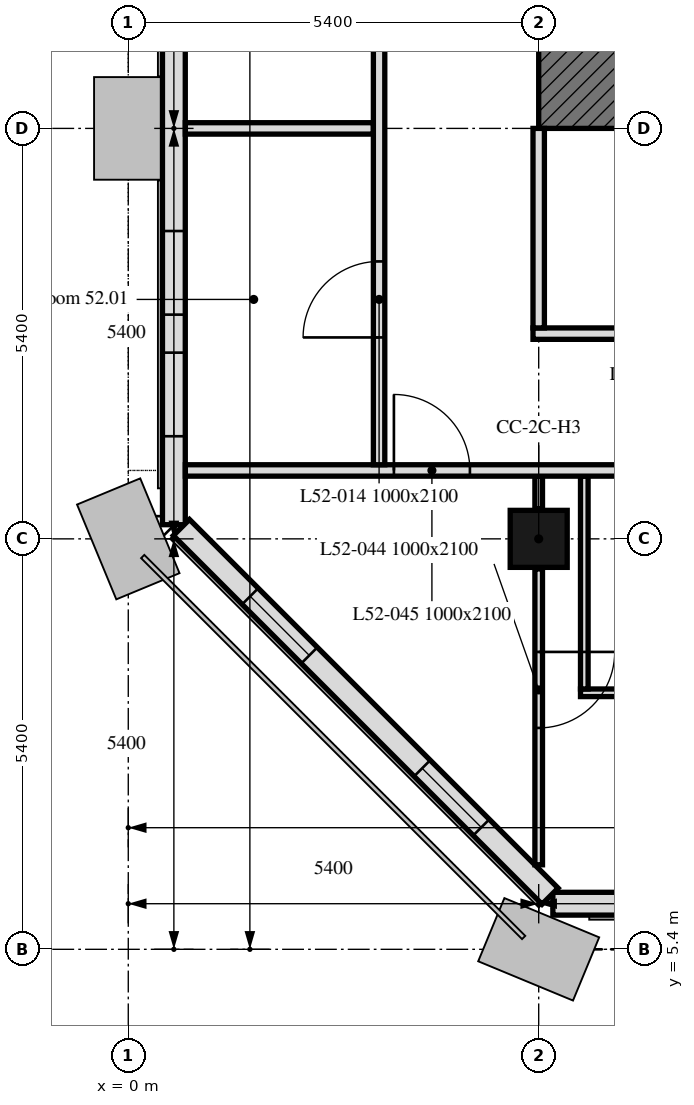
"""IFC4 building model, lengths in metres.
Left out: names, types, materials, properties, quantities, classifications, styles, units other than length and angle.
Written with IfcOpenShell. Run it as: python <this file> out.ifc"""

import sys

from ifc_helpers import new_model, si_unit, direction, frame, frame_2d, origin, origin_2d, place, context, subcontext, project, spatial, rectangle, extrude, element, fill, save


model = new_model("IFC4")
c1 = context("Model", 3, precision=1e-05, world=origin(), true_north=direction((0.0, 1.0)))
c2 = subcontext(c1, "Body", "Model", "MODEL_VIEW")
j1 = project(units=[si_unit("LENGTHUNIT", "METRE"), si_unit("PLANEANGLEUNIT", "RADIAN")], contexts=[c1])
p1 = place(None, origin())
s1 = spatial("IfcSite", under=j1, at=p1, CompositionType="ELEMENT")
p2 = place(p1, origin())
s2 = spatial("IfcBuilding", under=s1, at=p2, CompositionType="ELEMENT")
p3 = place(p2, frame((0.0, 0.0, 210.4)))
s3 = spatial("IfcBuildingStorey", under=s2, at=p3, CompositionType="ELEMENT", Elevation=210.4)
p4 = place(p3, frame((5.4, 10.8, 0.0), z_axis=(0.0, 0.0, 1.0), x_axis=(1.0, 0.0, 0.0)))
e1 = element("IfcColumn", 1, at=p4, inside=s3, PredefinedType="COLUMN", context=c2, shape_type="SweptSolid", body=[
    extrude(rectangle(XDim=0.75, YDim=0.75, at=origin_2d()), origin(), (0.0, 0.0, 1.0), 3.0),
])
p5 = place(p3, frame((5.586, 6.0, 0.0), z_axis=(0.0, 0.0, 1.0), x_axis=(1.0, 0.0, 0.0)))
e2 = element("IfcWall", 2, at=p5, inside=s3, PredefinedType="SOLIDWALL", context=c2, shape_type="SweptSolid", body=[
    extrude(rectangle(XDim=32.027, YDim=0.3, at=frame_2d((16.014, 0.0))), origin(), (0.0, 0.0, 1.0), 3.0),
])
p6 = place(p5, frame((2.764, 0.0, 0.9)))
e3 = element("IfcOpeningElement", 3, at=p6, cuts=e2, PredefinedType="OPENING", context=c2, shape_type="SweptSolid", body=[
    extrude(rectangle(XDim=1.1, YDim=1.7, at=frame_2d((0.55, 0.85))), frame((0.0, 0.16, 0.0), z_axis=(0.0, -1.0, 0.0), x_axis=(1.0, 0.0, 0.0)), (0.0, 0.0, 1.0), 0.32),
])
p7 = place(p5, frame((6.214, 0.0, 0.9)))
e4 = element("IfcOpeningElement", 4, at=p7, cuts=e2, PredefinedType="OPENING", context=c2, shape_type="SweptSolid", body=[
    extrude(rectangle(XDim=3.4, YDim=1.7, at=frame_2d((1.7, 0.85))), frame((0.0, 0.16, 0.0), z_axis=(0.0, -1.0, 0.0), x_axis=(1.0, 0.0, 0.0)), (0.0, 0.0, 1.0), 0.32),
])
p8 = place(p5, frame((13.564, 0.0, 0.9)))
e5 = element("IfcOpeningElement", 5, at=p8, cuts=e2, PredefinedType="OPENING", context=c2, shape_type="SweptSolid", body=[
    extrude(rectangle(XDim=1.1, YDim=1.7, at=frame_2d((0.55, 0.85))), frame((0.0, 0.16, 0.0), z_axis=(0.0, -1.0, 0.0), x_axis=(1.0, 0.0, 0.0)), (0.0, 0.0, 1.0), 0.32),
])
p9 = place(p5, frame((17.014, 0.0, 0.9)))
e6 = element("IfcOpeningElement", 6, at=p9, cuts=e2, PredefinedType="OPENING", context=c2, shape_type="SweptSolid", body=[
    extrude(rectangle(XDim=3.4, YDim=1.7, at=frame_2d((1.7, 0.85))), frame((0.0, 0.16, 0.0), z_axis=(0.0, -1.0, 0.0), x_axis=(1.0, 0.0, 0.0)), (0.0, 0.0, 1.0), 0.32),
])
p10 = place(p5, frame((24.364, 0.0, 0.9)))
e7 = element("IfcOpeningElement", 7, at=p10, cuts=e2, PredefinedType="OPENING", context=c2, shape_type="SweptSolid", body=[
    extrude(rectangle(XDim=1.1, YDim=1.7, at=frame_2d((0.55, 0.85))), frame((0.0, 0.16, 0.0), z_axis=(0.0, -1.0, 0.0), x_axis=(1.0, 0.0, 0.0)), (0.0, 0.0, 1.0), 0.32),
])
p11 = place(p5, frame((27.814, 0.0, 0.9)))
e8 = element("IfcOpeningElement", 8, at=p11, cuts=e2, PredefinedType="OPENING", context=c2, shape_type="SweptSolid", body=[
    extrude(rectangle(XDim=3.4, YDim=1.7, at=frame_2d((1.7, 0.85))), frame((0.0, 0.16, 0.0), z_axis=(0.0, -1.0, 0.0), x_axis=(1.0, 0.0, 0.0)), (0.0, 0.0, 1.0), 0.32),
])
p12 = place(p3, frame((0.6, 43.014, 0.0), z_axis=(0.0, 0.0, 1.0), x_axis=(0.0, -1.0, 0.0)))
e9 = element("IfcWall", 9, at=p12, inside=s3, PredefinedType="SOLIDWALL", context=c2, shape_type="SweptSolid", body=[
    extrude(rectangle(XDim=32.027, YDim=0.3, at=frame_2d((16.014, 0.0))), origin(), (0.0, 0.0, 1.0), 3.0),
])
p13 = place(p12, frame((1.164, 0.0, 0.9)))
e10 = element("IfcOpeningElement", 10, at=p13, cuts=e9, PredefinedType="OPENING", context=c2, shape_type="SweptSolid", body=[
    extrude(rectangle(XDim=1.1, YDim=1.7, at=frame_2d((0.55, 0.85))), frame((0.0, 0.16, 0.0), z_axis=(0.0, -1.0, 0.0), x_axis=(1.0, 0.0, 0.0)), (0.0, 0.0, 1.0), 0.32),
])
p14 = place(p12, frame((3.139, 0.0, 0.9)))
e11 = element("IfcOpeningElement", 11, at=p14, cuts=e9, PredefinedType="OPENING", context=c2, shape_type="SweptSolid", body=[
    extrude(rectangle(XDim=0.65, YDim=1.7, at=frame_2d((0.325, 0.85))), frame((0.0, 0.16, 0.0), z_axis=(0.0, -1.0, 0.0), x_axis=(1.0, 0.0, 0.0)), (0.0, 0.0, 1.0), 0.32),
])
p15 = place(p12, frame((6.214, 0.0, 0.9)))
e12 = element("IfcOpeningElement", 12, at=p15, cuts=e9, PredefinedType="OPENING", context=c2, shape_type="SweptSolid", body=[
    extrude(rectangle(XDim=3.4, YDim=1.7, at=frame_2d((1.7, 0.85))), frame((0.0, 0.16, 0.0), z_axis=(0.0, -1.0, 0.0), x_axis=(1.0, 0.0, 0.0)), (0.0, 0.0, 1.0), 0.32),
])
p16 = place(p12, frame((11.964, 0.0, 0.9)))
e13 = element("IfcOpeningElement", 13, at=p16, cuts=e9, PredefinedType="OPENING", context=c2, shape_type="SweptSolid", body=[
    extrude(rectangle(XDim=1.1, YDim=1.7, at=frame_2d((0.55, 0.85))), frame((0.0, 0.16, 0.0), z_axis=(0.0, -1.0, 0.0), x_axis=(1.0, 0.0, 0.0)), (0.0, 0.0, 1.0), 0.32),
])
p17 = place(p12, frame((13.564, 0.0, 0.9)))
e14 = element("IfcOpeningElement", 14, at=p17, cuts=e9, PredefinedType="OPENING", context=c2, shape_type="SweptSolid", body=[
    extrude(rectangle(XDim=1.1, YDim=1.7, at=frame_2d((0.55, 0.85))), frame((0.0, 0.16, 0.0), z_axis=(0.0, -1.0, 0.0), x_axis=(1.0, 0.0, 0.0)), (0.0, 0.0, 1.0), 0.32),
])
p18 = place(p12, frame((17.364, 0.0, 0.9)))
e15 = element("IfcOpeningElement", 15, at=p18, cuts=e9, PredefinedType="OPENING", context=c2, shape_type="SweptSolid", body=[
    extrude(rectangle(XDim=1.1, YDim=1.7, at=frame_2d((0.55, 0.85))), frame((0.0, 0.16, 0.0), z_axis=(0.0, -1.0, 0.0), x_axis=(1.0, 0.0, 0.0)), (0.0, 0.0, 1.0), 0.32),
])
p19 = place(p12, frame((18.964, 0.0, 0.9)))
e16 = element("IfcOpeningElement", 16, at=p19, cuts=e9, PredefinedType="OPENING", context=c2, shape_type="SweptSolid", body=[
    extrude(rectangle(XDim=1.1, YDim=1.7, at=frame_2d((0.55, 0.85))), frame((0.0, 0.16, 0.0), z_axis=(0.0, -1.0, 0.0), x_axis=(1.0, 0.0, 0.0)), (0.0, 0.0, 1.0), 0.32),
])
p20 = place(p12, frame((22.764, 0.0, 0.9)))
e17 = element("IfcOpeningElement", 17, at=p20, cuts=e9, PredefinedType="OPENING", context=c2, shape_type="SweptSolid", body=[
    extrude(rectangle(XDim=1.1, YDim=1.7, at=frame_2d((0.55, 0.85))), frame((0.0, 0.16, 0.0), z_axis=(0.0, -1.0, 0.0), x_axis=(1.0, 0.0, 0.0)), (0.0, 0.0, 1.0), 0.32),
])
p21 = place(p12, frame((24.364, 0.0, 0.9)))
e18 = element("IfcOpeningElement", 18, at=p21, cuts=e9, PredefinedType="OPENING", context=c2, shape_type="SweptSolid", body=[
    extrude(rectangle(XDim=1.1, YDim=1.7, at=frame_2d((0.55, 0.85))), frame((0.0, 0.16, 0.0), z_axis=(0.0, -1.0, 0.0), x_axis=(1.0, 0.0, 0.0)), (0.0, 0.0, 1.0), 0.32),
])
p22 = place(p12, frame((28.164, 0.0, 0.9)))
e19 = element("IfcOpeningElement", 19, at=p22, cuts=e9, PredefinedType="OPENING", context=c2, shape_type="SweptSolid", body=[
    extrude(rectangle(XDim=1.1, YDim=1.7, at=frame_2d((0.55, 0.85))), frame((0.0, 0.16, 0.0), z_axis=(0.0, -1.0, 0.0), x_axis=(1.0, 0.0, 0.0)), (0.0, 0.0, 1.0), 0.32),
])
p23 = place(p12, frame((29.764, 0.0, 0.9)))
e20 = element("IfcOpeningElement", 20, at=p23, cuts=e9, PredefinedType="OPENING", context=c2, shape_type="SweptSolid", body=[
    extrude(rectangle(XDim=1.1, YDim=1.7, at=frame_2d((0.55, 0.85))), frame((0.0, 0.16, 0.0), z_axis=(0.0, -1.0, 0.0), x_axis=(1.0, 0.0, 0.0)), (0.0, 0.0, 1.0), 0.32),
])
p24 = place(p3, frame((0.699, 10.949, 0.0), z_axis=(0.0, 0.0, 1.0), x_axis=(0.707106781187, -0.707106781187, 0.0)))
e21 = element("IfcWall", 21, at=p24, inside=s3, PredefinedType="SOLIDWALL", context=c2, shape_type="SweptSolid", body=[
    extrude(rectangle(XDim=6.86, YDim=0.3, at=frame_2d((3.43, 0.0))), origin(), (0.0, 0.0, 1.0), 3.0),
])
p25 = place(p24, frame((1.28, 0.0, 0.9)))
e22 = element("IfcOpeningElement", 22, at=p25, cuts=e21, PredefinedType="OPENING", context=c2, shape_type="SweptSolid", body=[
    extrude(rectangle(XDim=1.1, YDim=1.7, at=frame_2d((0.55, 0.85))), frame((0.0, 0.16, 0.0), z_axis=(0.0, -1.0, 0.0), x_axis=(1.0, 0.0, 0.0)), (0.0, 0.0, 1.0), 0.32),
])
p26 = place(p24, frame((4.48, 0.0, 0.9)))
e23 = element("IfcOpeningElement", 23, at=p26, cuts=e21, PredefinedType="OPENING", context=c2, shape_type="SweptSolid", body=[
    extrude(rectangle(XDim=1.1, YDim=1.7, at=frame_2d((0.55, 0.85))), frame((0.0, 0.16, 0.0), z_axis=(0.0, -1.0, 0.0), x_axis=(1.0, 0.0, 0.0)), (0.0, 0.0, 1.0), 0.32),
])
p27 = place(p3, frame((6.0, 16.2, 0.0), z_axis=(0.0, 0.0, 1.0), x_axis=(0.0, 1.0, 0.0)))
e24 = element("IfcWall", 24, at=p27, inside=s3, PredefinedType="SOLIDWALL", context=c2, shape_type="SweptSolid", body=[
    extrude(rectangle(XDim=16.2, YDim=1.2, at=frame_2d((8.1, 0.0))), origin(), (0.0, 0.0, 1.0), 3.0),
])
p28 = place(p3, frame((3.225, 16.2, 0.0), z_axis=(0.0, 0.0, 1.0), x_axis=(-1.0, 0.0, 0.0)))
e25 = element("IfcWall", 25, at=p28, inside=s3, PredefinedType="PARTITIONING", context=c2, shape_type="SweptSolid", body=[
    extrude(rectangle(XDim=2.474, YDim=0.15, at=frame_2d((1.237, 0.0))), origin(), (0.0, 0.0, 1.0), 2.4),
])
p29 = place(p3, frame((8.35, 8.775, 0.0), z_axis=(0.0, 0.0, 1.0), x_axis=(-1.0, 0.0, 0.0)))
e26 = element("IfcWall", 26, at=p29, inside=s3, PredefinedType="PARTITIONING", context=c2, shape_type="SweptSolid", body=[
    extrude(rectangle(XDim=2.4, YDim=0.1, at=frame_2d((1.2, 0.0))), origin(), (0.0, 0.0, 1.0), 3.0),
])
p30 = place(p3, frame((6.0, 8.825, 0.0), z_axis=(0.0, 0.0, 1.0), x_axis=(0.0, 1.0, 0.0)))
e27 = element("IfcWall", 27, at=p30, inside=s3, PredefinedType="PARTITIONING", context=c2, shape_type="SweptSolid", body=[
    extrude(rectangle(XDim=2.8, YDim=0.1, at=frame_2d((1.4, 0.0))), origin(), (0.0, 0.0, 1.0), 3.0),
])
p31 = place(p3, frame((5.4, 11.625, 0.0), z_axis=(0.0, 0.0, 1.0), x_axis=(0.0, -1.0, 0.0)))
e28 = element("IfcWall", 28, at=p31, inside=s3, PredefinedType="PARTITIONING", context=c2, shape_type="SweptSolid", body=[
    extrude(rectangle(XDim=0.43, YDim=0.1, at=frame_2d((0.215, 0.0))), origin(), (0.0, 0.0, 1.0), 3.0),
])
p32 = place(p3, frame((5.4, 10.405, 0.0), z_axis=(0.0, 0.0, 1.0), x_axis=(0.0, -1.0, 0.0)))
e29 = element("IfcWall", 29, at=p32, inside=s3, PredefinedType="PARTITIONING", context=c2, shape_type="SweptSolid", body=[
    extrude(rectangle(XDim=3.893, YDim=0.1, at=frame_2d((1.946, 0.0))), origin(), (0.0, 0.0, 1.0), 3.0),
])
p33 = place(p32, frame((1.093, 0.0, 0.0)))
e30 = element("IfcOpeningElement", 30, at=p33, cuts=e29, PredefinedType="OPENING", context=c2, shape_type="SweptSolid", body=[
    extrude(rectangle(XDim=1.0, YDim=2.1, at=frame_2d((0.5, 1.05))), frame((0.0, 0.05, 0.0), z_axis=(0.0, -1.0, 0.0), x_axis=(1.0, 0.0, 0.0)), (0.0, 0.0, 1.0), 0.1),
])
p34 = place(p3, frame((0.751, 11.7, 0.0), z_axis=(0.0, 0.0, 1.0), x_axis=(1.0, 0.0, 0.0)))
e31 = element("IfcWall", 31, at=p34, inside=s3, PredefinedType="PARTITIONING", context=c2, shape_type="SweptSolid", body=[
    extrude(rectangle(XDim=41.698, YDim=0.15, at=frame_2d((20.849, 0.0))), origin(), (0.0, 0.0, 1.0), 3.0),
])
p35 = place(p34, frame((39.249, 0.0, 0.0)))
e32 = element("IfcOpeningElement", 32, at=p35, cuts=e31, PredefinedType="OPENING", context=c2, shape_type="SweptSolid", body=[
    extrude(rectangle(XDim=1.0, YDim=2.1, at=frame_2d((0.5, 1.05))), frame((0.0, 0.075, 0.0), z_axis=(0.0, -1.0, 0.0), x_axis=(1.0, 0.0, 0.0)), (0.0, 0.0, 1.0), 0.15),
])
p36 = place(p34, frame((27.649, 0.0, 0.0)))
e33 = element("IfcOpeningElement", 33, at=p36, cuts=e31, PredefinedType="OPENING", context=c2, shape_type="SweptSolid", body=[
    extrude(rectangle(XDim=1.0, YDim=2.1, at=frame_2d((0.5, 1.05))), frame((0.0, 0.075, 0.0), z_axis=(0.0, -1.0, 0.0), x_axis=(1.0, 0.0, 0.0)), (0.0, 0.0, 1.0), 0.15),
])
p37 = place(p34, frame((22.249, 0.0, 0.0)))
e34 = element("IfcOpeningElement", 34, at=p37, cuts=e31, PredefinedType="OPENING", context=c2, shape_type="SweptSolid", body=[
    extrude(rectangle(XDim=1.0, YDim=2.1, at=frame_2d((0.5, 1.05))), frame((0.0, 0.075, 0.0), z_axis=(0.0, -1.0, 0.0), x_axis=(1.0, 0.0, 0.0)), (0.0, 0.0, 1.0), 0.15),
])
p38 = place(p34, frame((16.849, 0.0, 0.0)))
e35 = element("IfcOpeningElement", 35, at=p38, cuts=e31, PredefinedType="OPENING", context=c2, shape_type="SweptSolid", body=[
    extrude(rectangle(XDim=1.0, YDim=2.1, at=frame_2d((0.5, 1.05))), frame((0.0, 0.075, 0.0), z_axis=(0.0, -1.0, 0.0), x_axis=(1.0, 0.0, 0.0)), (0.0, 0.0, 1.0), 0.15),
])
p39 = place(p34, frame((11.449, 0.0, 0.0)))
e36 = element("IfcOpeningElement", 36, at=p39, cuts=e31, PredefinedType="OPENING", context=c2, shape_type="SweptSolid", body=[
    extrude(rectangle(XDim=1.0, YDim=2.1, at=frame_2d((0.5, 1.05))), frame((0.0, 0.075, 0.0), z_axis=(0.0, -1.0, 0.0), x_axis=(1.0, 0.0, 0.0)), (0.0, 0.0, 1.0), 0.15),
])
p40 = place(p34, frame((2.744, 0.0, 0.0)))
e37 = element("IfcOpeningElement", 37, at=p40, cuts=e31, PredefinedType="OPENING", context=c2, shape_type="SweptSolid", body=[
    extrude(rectangle(XDim=1.0, YDim=2.1, at=frame_2d((0.5, 1.05))), frame((0.0, 0.075, 0.0), z_axis=(0.0, -1.0, 0.0), x_axis=(1.0, 0.0, 0.0)), (0.0, 0.0, 1.0), 0.15),
])
p41 = place(p3, frame((3.3, 11.775, 0.0), z_axis=(0.0, 0.0, 1.0), x_axis=(0.0, 1.0, 0.0)))
e38 = element("IfcWall", 38, at=p41, inside=s3, PredefinedType="PARTITIONING", context=c2, shape_type="SweptSolid", body=[
    extrude(rectangle(XDim=28.2, YDim=0.15, at=frame_2d((14.1, 0.0))), origin(), (0.0, 0.0, 1.0), 2.4),
])
p42 = place(p41, frame((17.425, 0.0, 0.0)))
e39 = element("IfcOpeningElement", 39, at=p42, cuts=e38, PredefinedType="OPENING", context=c2, shape_type="SweptSolid", body=[
    extrude(rectangle(XDim=1.0, YDim=2.1, at=frame_2d((0.5, 1.05))), frame((0.0, 0.075, 0.0), z_axis=(0.0, -1.0, 0.0), x_axis=(1.0, 0.0, 0.0)), (0.0, 0.0, 1.0), 0.15),
])
p43 = place(p41, frame((1.675, 0.0, 0.0)))
e40 = element("IfcOpeningElement", 40, at=p43, cuts=e38, PredefinedType="OPENING", context=c2, shape_type="SweptSolid", body=[
    extrude(rectangle(XDim=1.0, YDim=2.1, at=frame_2d((0.5, 1.05))), frame((0.0, 0.075, 0.0), z_axis=(0.0, -1.0, 0.0), x_axis=(1.0, 0.0, 0.0)), (0.0, 0.0, 1.0), 0.15),
])
p44 = place(p41, frame((22.6, 0.0, 0.0)))
e41 = element("IfcOpeningElement", 41, at=p44, cuts=e38, PredefinedType="OPENING", context=c2, shape_type="SweptSolid", body=[
    extrude(rectangle(XDim=1.0, YDim=2.1, at=frame_2d((0.5, 1.05))), frame((0.0, 0.075, 0.0), z_axis=(0.0, -1.0, 0.0), x_axis=(1.0, 0.0, 0.0)), (0.0, 0.0, 1.0), 0.15),
])
p45 = place(p41, frame((7.975, 0.0, 0.0)))
e42 = element("IfcOpeningElement", 42, at=p45, cuts=e38, PredefinedType="OPENING", context=c2, shape_type="SweptSolid", body=[
    extrude(rectangle(XDim=1.0, YDim=2.1, at=frame_2d((0.5, 1.05))), frame((0.0, 0.075, 0.0), z_axis=(0.0, -1.0, 0.0), x_axis=(1.0, 0.0, 0.0)), (0.0, 0.0, 1.0), 0.15),
])
p46 = place(p3, frame((5.325, 13.5, 0.0), z_axis=(0.0, 0.0, 1.0), x_axis=(1.0, 0.0, 0.0)))
e43 = element("IfcWall", 43, at=p46, inside=s3, PredefinedType="PARTITIONING", context=c2, shape_type="SweptSolid", body=[
    extrude(rectangle(XDim=7.525, YDim=0.15, at=frame_2d((3.763, 0.0))), origin(), (0.0, 0.0, 1.0), 3.0),
])
p47 = place(p46, frame((1.55, 0.0, 0.0)))
e44 = element("IfcOpeningElement", 44, at=p47, cuts=e43, PredefinedType="OPENING", context=c2, shape_type="SweptSolid", body=[
    extrude(rectangle(XDim=1.0, YDim=2.1, at=frame_2d((0.5, 1.05))), frame((0.0, 0.075, 0.0), z_axis=(0.0, -1.0, 0.0), x_axis=(1.0, 0.0, 0.0)), (0.0, 0.0, 1.0), 0.15),
])
p48 = place(p46, frame((5.475, 0.0, 0.0)))
e45 = element("IfcOpeningElement", 45, at=p48, cuts=e43, PredefinedType="OPENING", context=c2, shape_type="SweptSolid", body=[
    extrude(rectangle(XDim=1.8, YDim=2.4, at=frame_2d((0.9, 1.2))), frame((0.0, 0.075, 0.0), z_axis=(0.0, -1.0, 0.0), x_axis=(1.0, 0.0, 0.0)), (0.0, 0.0, 1.0), 0.15),
])
p49 = place(p3, frame((5.4, 13.575, 0.0), z_axis=(0.0, 0.0, 1.0), x_axis=(0.0, 1.0, 0.0)))
e46 = element("IfcWall", 46, at=p49, inside=s3, PredefinedType="PARTITIONING", context=c2, shape_type="SweptSolid", body=[
    extrude(rectangle(XDim=2.625, YDim=0.15, at=frame_2d((1.312, 0.0))), origin(), (0.0, 0.0, 1.0), 3.0),
])
p50 = place(p22, origin())
e47 = element("IfcWindow", 47, at=p50, inside=s3, PartitioningType="SINGLE_PANEL", PredefinedType="WINDOW", context=c2, shape_type="SweptSolid", body=[
    extrude(rectangle(XDim=1.1, YDim=1.7, at=frame_2d((0.55, 0.85))), frame((0.0, 0.03, 0.0), z_axis=(0.0, -1.0, 0.0), x_axis=(1.0, 0.0, 0.0)), (0.0, 0.0, 1.0), 0.06),
])
fill(e19, e47)
p51 = place(p23, origin())
e48 = element("IfcWindow", 48, at=p51, inside=s3, PartitioningType="SINGLE_PANEL", PredefinedType="WINDOW", context=c2, shape_type="SweptSolid", body=[
    extrude(rectangle(XDim=1.1, YDim=1.7, at=frame_2d((0.55, 0.85))), frame((0.0, 0.03, 0.0), z_axis=(0.0, -1.0, 0.0), x_axis=(1.0, 0.0, 0.0)), (0.0, 0.0, 1.0), 0.06),
])
fill(e20, e48)
p52 = place(p25, origin())
e49 = element("IfcWindow", 49, at=p52, inside=s3, PartitioningType="SINGLE_PANEL", PredefinedType="WINDOW", context=c2, shape_type="SweptSolid", body=[
    extrude(rectangle(XDim=1.1, YDim=1.7, at=frame_2d((0.55, 0.85))), frame((0.0, 0.03, 0.0), z_axis=(0.0, -1.0, 0.0), x_axis=(1.0, 0.0, 0.0)), (0.0, 0.0, 1.0), 0.06),
])
fill(e22, e49)
p53 = place(p26, origin())
e50 = element("IfcWindow", 50, at=p53, inside=s3, PartitioningType="SINGLE_PANEL", PredefinedType="WINDOW", context=c2, shape_type="SweptSolid", body=[
    extrude(rectangle(XDim=1.1, YDim=1.7, at=frame_2d((0.55, 0.85))), frame((0.0, 0.03, 0.0), z_axis=(0.0, -1.0, 0.0), x_axis=(1.0, 0.0, 0.0)), (0.0, 0.0, 1.0), 0.06),
])
fill(e23, e50)
p54 = place(p43, origin())
e51 = element("IfcDoor", 51, at=p54, inside=s3, OperationType="SINGLE_SWING_LEFT", PredefinedType="DOOR", context=c2, shape_type="SweptSolid", body=[
    extrude(rectangle(XDim=1.0, YDim=2.1, at=frame_2d((0.5, 1.05))), frame((0.0, 0.025, 0.0), z_axis=(0.0, -1.0, 0.0), x_axis=(1.0, 0.0, 0.0)), (0.0, 0.0, 1.0), 0.05),
])
fill(e40, e51)
p55 = place(p33, origin())
e52 = element("IfcDoor", 52, at=p55, inside=s3, OperationType="SINGLE_SWING_LEFT", PredefinedType="DOOR", context=c2, shape_type="SweptSolid", body=[
    extrude(rectangle(XDim=1.0, YDim=2.1, at=frame_2d((0.5, 1.05))), frame((0.0, 0.025, 0.0), z_axis=(0.0, -1.0, 0.0), x_axis=(1.0, 0.0, 0.0)), (0.0, 0.0, 1.0), 0.05),
])
fill(e30, e52)
p56 = place(p40, origin())
e53 = element("IfcDoor", 53, at=p56, inside=s3, OperationType="SINGLE_SWING_LEFT", PredefinedType="DOOR", context=c2, shape_type="SweptSolid", body=[
    extrude(rectangle(XDim=1.0, YDim=2.1, at=frame_2d((0.5, 1.05))), frame((0.0, 0.025, 0.0), z_axis=(0.0, -1.0, 0.0), x_axis=(1.0, 0.0, 0.0)), (0.0, 0.0, 1.0), 0.05),
])
fill(e37, e53)
save(model, sys.argv[1])
